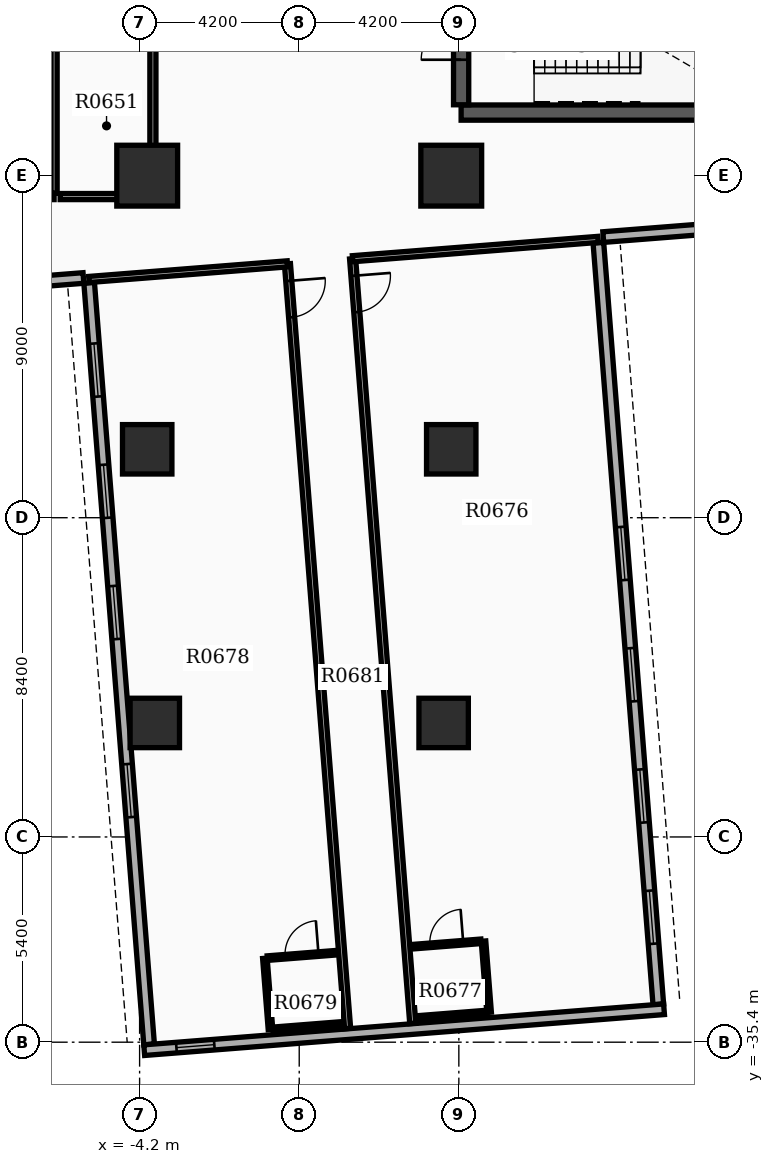
"""IFC4 building model, lengths in metres.
Left out: names, types, materials, properties, quantities, classifications, styles, units other than length and angle.
Written with IfcOpenShell. Run it as: python <this file> out.ifc"""

import sys

from ifc_helpers import new_model, si_unit, direction, frame, frame_2d, origin, origin_2d, place, context, subcontext, project, spatial, rectangle, extrude, element, fill, save


model = new_model("IFC4")
c1 = context("Model", 3, precision=1e-05, world=origin(), true_north=direction((0.0, 1.0)))
c2 = subcontext(c1, "Body", "Model", "MODEL_VIEW")
j1 = project(units=[si_unit("LENGTHUNIT", "METRE"), si_unit("PLANEANGLEUNIT", "RADIAN")], contexts=[c1])
p1 = place(None, origin())
s1 = spatial("IfcSite", under=j1, at=p1, CompositionType="ELEMENT")
p2 = place(p1, origin())
s2 = spatial("IfcBuilding", under=s1, at=p2, CompositionType="ELEMENT")
p3 = place(p2, frame((0.0, 0.0, 43.2)))
s3 = spatial("IfcBuildingStorey", under=s2, at=p3, CompositionType="ELEMENT", Elevation=43.2)
p4 = place(p3, frame((4.26, -10.94, 0.0), z_axis=(0.0, 0.0, 1.0), x_axis=(1.0, 0.0, 0.0)))
e1 = element("IfcWall", 1, at=p4, inside=s3, PredefinedType="SHEAR", context=c2, shape_type="SweptSolid", body=[
    extrude(rectangle(XDim=7.96, YDim=0.4, at=frame_2d((3.98, 0.0))), origin(), (0.0, 0.0, 1.0), 3.65),
])
p5 = place(p3, frame((4.26, -10.735, 0.0), z_axis=(0.0, 0.0, 1.0), x_axis=(0.0, 1.0, 0.0)))
e2 = element("IfcWall", 2, at=p5, inside=s3, PredefinedType="SHEAR", context=c2, shape_type="SweptSolid", body=[
    extrude(rectangle(XDim=3.43, YDim=0.4, at=frame_2d((1.715, 0.0))), origin(), (0.0, 0.0, 1.0), 3.65),
])
p6 = place(p5, frame((1.185, 0.0, 0.0)))
e3 = element("IfcOpeningElement", 3, at=p6, cuts=e2, PredefinedType="OPENING", context=c2, shape_type="SweptSolid", body=[
    extrude(rectangle(XDim=1.05, YDim=2.15, at=frame_2d((0.525, 1.075))), frame((0.0, 0.21, 0.0), z_axis=(0.0, -1.0, 0.0), x_axis=(1.0, 0.0, 0.0)), (0.0, 0.0, 1.0), 0.42),
])
for number, where, z_axis, x_axis in (
    (4, (-4.0, -12.6, 0.0), (0.0, 0.0, 1.0), (1.0, 0.0, 0.0)),
    (5, (4.0, -12.6, 0.0), (0.0, 0.0, 1.0), (1.0, 0.0, 0.0)),
):
    element("IfcColumn", number, at=place(p3, frame(where, z_axis=z_axis, x_axis=x_axis)), inside=s3, PredefinedType="COLUMN", context=c2, shape_type="SweptSolid", body=[
        extrude(rectangle(XDim=1.6, YDim=1.6, at=origin_2d()), origin(), (0.0, 0.0, 1.0), 3.9),
    ])
for number, where, z_axis, x_axis in (
    (6, (-4.0, -19.8, 0.0), (0.0, 0.0, 1.0), (1.0, 0.0, 0.0)),
    (7, (4.0, -19.8, 0.0), (0.0, 0.0, 1.0), (1.0, 0.0, 0.0)),
    (8, (-3.8, -27.0, 0.0), (0.0, 0.0, 1.0), (1.0, 0.0, 0.0)),
    (9, (3.8, -27.0, 0.0), (0.0, 0.0, 1.0), (1.0, 0.0, 0.0)),
):
    element("IfcColumn", number, at=place(p3, frame(where, z_axis=z_axis, x_axis=x_axis)), inside=s3, PredefinedType="COLUMN", context=c2, shape_type="SweptSolid", body=[
        extrude(rectangle(XDim=1.3, YDim=1.3, at=origin_2d()), origin(), (0.0, 0.0, 1.0), 3.9),
    ])
p7 = place(p3, frame((-5.527, -15.421, 0.0), z_axis=(0.0, 0.0, 1.0), x_axis=(0.078452802979, -0.996917828963, 0.0)))
e10 = element("IfcWall", 10, at=p7, inside=s3, PredefinedType="STANDARD", context=c2, shape_type="SweptSolid", body=[
    extrude(rectangle(XDim=20.1, YDim=0.28, at=frame_2d((10.05, 0.0))), origin(), (0.0, 0.0, 1.0), 2.86),
])
p8 = place(p7, frame((1.6, 0.0, 0.8)))
e11 = element("IfcOpeningElement", 11, at=p8, cuts=e10, PredefinedType="OPENING", context=c2, shape_type="SweptSolid", body=[
    extrude(rectangle(XDim=1.4, YDim=1.6, at=frame_2d((0.7, 0.8))), frame((0.0, 0.15, 0.0), z_axis=(0.0, -1.0, 0.0), x_axis=(1.0, 0.0, 0.0)), (0.0, 0.0, 1.0), 0.3),
])
p9 = place(p7, frame((4.8, 0.0, 0.8)))
e12 = element("IfcOpeningElement", 12, at=p9, cuts=e10, PredefinedType="OPENING", context=c2, shape_type="SweptSolid", body=[
    extrude(rectangle(XDim=1.4, YDim=1.6, at=frame_2d((0.7, 0.8))), frame((0.0, 0.15, 0.0), z_axis=(0.0, -1.0, 0.0), x_axis=(1.0, 0.0, 0.0)), (0.0, 0.0, 1.0), 0.3),
])
p10 = place(p7, frame((8.0, 0.0, 0.8)))
e13 = element("IfcOpeningElement", 13, at=p10, cuts=e10, PredefinedType="OPENING", context=c2, shape_type="SweptSolid", body=[
    extrude(rectangle(XDim=1.4, YDim=1.6, at=frame_2d((0.7, 0.8))), frame((0.0, 0.15, 0.0), z_axis=(0.0, -1.0, 0.0), x_axis=(1.0, 0.0, 0.0)), (0.0, 0.0, 1.0), 0.3),
])
p11 = place(p7, frame((12.7, 0.0, 0.8)))
e14 = element("IfcOpeningElement", 14, at=p11, cuts=e10, PredefinedType="OPENING", context=c2, shape_type="SweptSolid", body=[
    extrude(rectangle(XDim=1.4, YDim=1.6, at=frame_2d((0.7, 0.8))), frame((0.0, 0.15, 0.0), z_axis=(0.0, -1.0, 0.0), x_axis=(1.0, 0.0, 0.0)), (0.0, 0.0, 1.0), 0.3),
])
p12 = place(p3, frame((9.448, -34.405, 0.0), z_axis=(0.0, 0.0, 1.0), x_axis=(-0.078452802979, 0.996917828963, 0.0)))
e15 = element("IfcWall", 15, at=p12, inside=s3, PredefinedType="STANDARD", context=c2, shape_type="SweptSolid", body=[
    extrude(rectangle(XDim=20.1, YDim=0.28, at=frame_2d((10.05, 0.0))), origin(), (0.0, 0.0, 1.0), 2.86),
])
p13 = place(p12, frame((1.6, 0.0, 0.8)))
e16 = element("IfcOpeningElement", 16, at=p13, cuts=e15, PredefinedType="OPENING", context=c2, shape_type="SweptSolid", body=[
    extrude(rectangle(XDim=1.4, YDim=1.6, at=frame_2d((0.7, 0.8))), frame((0.0, 0.15, 0.0), z_axis=(0.0, -1.0, 0.0), x_axis=(1.0, 0.0, 0.0)), (0.0, 0.0, 1.0), 0.3),
])
p14 = place(p12, frame((4.8, 0.0, 0.8)))
e17 = element("IfcOpeningElement", 17, at=p14, cuts=e15, PredefinedType="OPENING", context=c2, shape_type="SweptSolid", body=[
    extrude(rectangle(XDim=1.4, YDim=1.6, at=frame_2d((0.7, 0.8))), frame((0.0, 0.15, 0.0), z_axis=(0.0, -1.0, 0.0), x_axis=(1.0, 0.0, 0.0)), (0.0, 0.0, 1.0), 0.3),
])
p15 = place(p12, frame((8.0, 0.0, 0.8)))
e18 = element("IfcOpeningElement", 18, at=p15, cuts=e15, PredefinedType="OPENING", context=c2, shape_type="SweptSolid", body=[
    extrude(rectangle(XDim=1.4, YDim=1.6, at=frame_2d((0.7, 0.8))), frame((0.0, 0.15, 0.0), z_axis=(0.0, -1.0, 0.0), x_axis=(1.0, 0.0, 0.0)), (0.0, 0.0, 1.0), 0.3),
])
p16 = place(p12, frame((11.2, 0.0, 0.8)))
e19 = element("IfcOpeningElement", 19, at=p16, cuts=e15, PredefinedType="OPENING", context=c2, shape_type="SweptSolid", body=[
    extrude(rectangle(XDim=1.4, YDim=1.6, at=frame_2d((0.7, 0.8))), frame((0.0, 0.15, 0.0), z_axis=(0.0, -1.0, 0.0), x_axis=(1.0, 0.0, 0.0)), (0.0, 0.0, 1.0), 0.3),
])
p17 = place(p3, frame((-4.079, -35.61, 0.0), z_axis=(0.0, 0.0, 1.0), x_axis=(0.996916198482, 0.078473519122, 0.0)))
e20 = element("IfcWall", 20, at=p17, inside=s3, PredefinedType="STANDARD", context=c2, shape_type="SweptSolid", body=[
    extrude(rectangle(XDim=13.72, YDim=0.28, at=frame_2d((6.86, 0.0))), origin(), (0.0, 0.0, 1.0), 2.86),
])
p18 = place(p17, frame((0.85, 0.0, 0.85)))
e21 = element("IfcOpeningElement", 21, at=p18, cuts=e20, PredefinedType="OPENING", context=c2, shape_type="SweptSolid", body=[
    extrude(rectangle(XDim=1.0, YDim=1.5, at=frame_2d((0.5, 0.75))), frame((0.0, 0.15, 0.0), z_axis=(0.0, -1.0, 0.0), x_axis=(1.0, 0.0, 0.0)), (0.0, 0.0, 1.0), 0.3),
])
p19 = place(p3, frame((-11.958, -15.787, 0.0), z_axis=(0.0, 0.0, 1.0), x_axis=(0.996916125428, 0.078474447191, 0.0)))
e22 = element("IfcWall", 22, at=p19, inside=s3, PredefinedType="STANDARD", context=c2, shape_type="SweptSolid", body=[
    extrude(rectangle(XDim=6.3, YDim=0.28, at=frame_2d((3.15, 0.0))), origin(), (0.0, 0.0, 1.0), 2.86),
])
p20 = place(p3, frame((14.281, -13.722, 0.0), z_axis=(0.0, 0.0, 1.0), x_axis=(-0.99691915642, -0.078435932851, 0.0)))
e23 = element("IfcWall", 23, at=p20, inside=s3, PredefinedType="STANDARD", context=c2, shape_type="SweptSolid", body=[
    extrude(rectangle(XDim=6.3, YDim=0.28, at=frame_2d((3.15, 0.0))), origin(), (0.0, 0.0, 1.0), 2.86),
])
p21 = place(p3, frame((-12.4, -13.15, 0.0), z_axis=(0.0, 0.0, 1.0), x_axis=(1.0, 0.0, 0.0)))
e24 = element("IfcWall", 24, at=p21, inside=s3, PredefinedType="PARTITIONING", context=c2, shape_type="SweptSolid", body=[
    extrude(rectangle(XDim=5.95, YDim=0.16, at=frame_2d((2.975, 0.0))), origin(), (0.0, 0.0, 1.0), 2.85),
])
p22 = place(p3, frame((-6.45, -13.065, 0.0), z_axis=(0.0, 0.0, 1.0), x_axis=(0.0, 1.0, 0.0)))
e25 = element("IfcWall", 25, at=p22, inside=s3, PredefinedType="PARTITIONING", context=c2, shape_type="SweptSolid", body=[
    extrude(rectangle(XDim=4.23, YDim=0.16, at=frame_2d((2.115, 0.0))), origin(), (0.0, 0.0, 1.0), 2.85),
])
p23 = place(p3, frame((-6.29, -13.15, 0.0), z_axis=(0.0, 0.0, 1.0), x_axis=(1.0, 0.0, 0.0)))
e26 = element("IfcWall", 26, at=p23, inside=s3, PredefinedType="PARTITIONING", context=c2, shape_type="SweptSolid", body=[
    extrude(rectangle(XDim=2.44, YDim=0.16, at=frame_2d((1.22, 0.0))), origin(), (0.0, 0.0, 1.0), 2.85),
])
p24 = place(p3, frame((-3.85, -13.065, 0.0), z_axis=(0.0, 0.0, 1.0), x_axis=(0.0, 1.0, 0.0)))
e27 = element("IfcWall", 27, at=p24, inside=s3, PredefinedType="PARTITIONING", context=c2, shape_type="SweptSolid", body=[
    extrude(rectangle(XDim=4.23, YDim=0.16, at=frame_2d((2.115, 0.0))), origin(), (0.0, 0.0, 1.0), 2.85),
])
p25 = place(p3, frame((1.404, -14.785, 0.0), z_axis=(0.0, 0.0, 1.0), x_axis=(0.078460461943, -0.996917226209, 0.0)))
e28 = element("IfcWall", 28, at=p25, inside=s3, PredefinedType="PARTITIONING", context=c2, shape_type="SweptSolid", body=[
    extrude(rectangle(XDim=20.182, YDim=0.16, at=frame_2d((10.091, 0.0))), origin(), (0.0, 0.0, 1.0), 2.85),
])
p26 = place(p25, frame((0.45, 0.0, 0.0)))
e29 = element("IfcOpeningElement", 29, at=p26, cuts=e28, PredefinedType="OPENING", context=c2, shape_type="SweptSolid", body=[
    extrude(rectangle(XDim=0.96, YDim=2.15, at=frame_2d((0.48, 1.075))), frame((0.0, 0.09, 0.0), z_axis=(0.0, -1.0, 0.0), x_axis=(1.0, 0.0, 0.0)), (0.0, 0.0, 1.0), 0.18),
])
p27 = place(p3, frame((1.404, -14.785, 0.0), z_axis=(0.0, 0.0, 1.0), x_axis=(0.996918883175, 0.07843940572, 0.0)))
e30 = element("IfcWall", 30, at=p27, inside=s3, PredefinedType="PARTITIONING", context=c2, shape_type="SweptSolid", body=[
    extrude(rectangle(XDim=6.48, YDim=0.16, at=frame_2d((3.24, 0.0))), origin(), (0.0, 0.0, 1.0), 2.85),
])
p28 = place(p3, frame((2.969, -32.888, 0.0), z_axis=(0.0, 0.0, 1.0), x_axis=(0.996916400774, 0.0784709492, 0.0)))
e31 = element("IfcWall", 31, at=p28, inside=s3, PredefinedType="PARTITIONING", context=c2, shape_type="SweptSolid", body=[
    extrude(rectangle(XDim=1.82, YDim=0.12, at=frame_2d((0.91, 0.0))), origin(), (0.0, 0.0, 1.0), 2.85),
])
p29 = place(p28, frame((0.47, 0.0, 0.0)))
e32 = element("IfcOpeningElement", 32, at=p29, cuts=e31, PredefinedType="OPENING", context=c2, shape_type="SweptSolid", body=[
    extrude(rectangle(XDim=0.88, YDim=2.1, at=frame_2d((0.44, 1.05))), frame((0.0, 0.07, 0.0), z_axis=(0.0, -1.0, 0.0), x_axis=(1.0, 0.0, 0.0)), (0.0, 0.0, 1.0), 0.14),
])
p30 = place(p3, frame((3.117, -34.763, 0.0), z_axis=(0.0, 0.0, 1.0), x_axis=(0.996915574626, 0.078481444107, 0.0)))
e33 = element("IfcWall", 33, at=p30, inside=s3, PredefinedType="PARTITIONING", context=c2, shape_type="SweptSolid", body=[
    extrude(rectangle(XDim=1.82, YDim=0.12, at=frame_2d((0.91, 0.0))), origin(), (0.0, 0.0, 1.0), 2.85),
])
p31 = place(p3, frame((4.849, -32.74, 0.0), z_axis=(0.0, 0.0, 1.0), x_axis=(0.07843418698, -0.996919293781, 0.0)))
e34 = element("IfcWall", 34, at=p31, inside=s3, PredefinedType="PARTITIONING", context=c2, shape_type="SweptSolid", body=[
    extrude(rectangle(XDim=1.88, YDim=0.12, at=frame_2d((0.94, 0.0))), origin(), (0.0, 0.0, 1.0), 2.85),
])
p32 = place(p3, frame((-0.31, -14.92, 0.0), z_axis=(0.0, 0.0, 1.0), x_axis=(0.078461408156, -0.996917151738, 0.0)))
e35 = element("IfcWall", 35, at=p32, inside=s3, PredefinedType="PARTITIONING", context=c2, shape_type="SweptSolid", body=[
    extrude(rectangle(XDim=20.182, YDim=0.16, at=frame_2d((10.091, 0.0))), origin(), (0.0, 0.0, 1.0), 2.85),
])
p33 = place(p32, frame((0.45, 0.0, 0.0)))
e36 = element("IfcOpeningElement", 36, at=p33, cuts=e35, PredefinedType="OPENING", context=c2, shape_type="SweptSolid", body=[
    extrude(rectangle(XDim=0.96, YDim=2.15, at=frame_2d((0.48, 1.075))), frame((0.0, 0.09, 0.0), z_axis=(0.0, -1.0, 0.0), x_axis=(1.0, 0.0, 0.0)), (0.0, 0.0, 1.0), 0.18),
])
p34 = place(p3, frame((-0.31, -14.92, 0.0), z_axis=(0.0, 0.0, 1.0), x_axis=(-0.996917262382, -0.07846000233, 0.0)))
e37 = element("IfcWall", 37, at=p34, inside=s3, PredefinedType="PARTITIONING", context=c2, shape_type="SweptSolid", body=[
    extrude(rectangle(XDim=5.24, YDim=0.16, at=frame_2d((2.62, 0.0))), origin(), (0.0, 0.0, 1.0), 2.85),
])
p35 = place(p3, frame((-0.839, -33.188, 0.0), z_axis=(0.0, 0.0, 1.0), x_axis=(0.996926062126, 0.078348112001, 0.0)))
e38 = element("IfcWall", 38, at=p35, inside=s3, PredefinedType="PARTITIONING", context=c2, shape_type="SweptSolid", body=[
    extrude(rectangle(XDim=1.82, YDim=0.12, at=frame_2d((0.91, 0.0))), origin(), (0.0, 0.0, 1.0), 2.85),
])
p36 = place(p35, frame((0.47, 0.0, 0.0)))
e39 = element("IfcOpeningElement", 39, at=p36, cuts=e38, PredefinedType="OPENING", context=c2, shape_type="SweptSolid", body=[
    extrude(rectangle(XDim=0.88, YDim=2.1, at=frame_2d((0.44, 1.05))), frame((0.0, 0.07, 0.0), z_axis=(0.0, -1.0, 0.0), x_axis=(1.0, 0.0, 0.0)), (0.0, 0.0, 1.0), 0.14),
])
p37 = place(p3, frame((-0.691, -35.062, 0.0), z_axis=(0.0, 0.0, 1.0), x_axis=(0.996916400774, 0.0784709492, 0.0)))
e40 = element("IfcWall", 40, at=p37, inside=s3, PredefinedType="PARTITIONING", context=c2, shape_type="SweptSolid", body=[
    extrude(rectangle(XDim=1.82, YDim=0.12, at=frame_2d((0.91, 0.0))), origin(), (0.0, 0.0, 1.0), 2.85),
])
p38 = place(p3, frame((-0.904, -33.193, 0.0), z_axis=(0.0, 0.0, 1.0), x_axis=(0.07843418698, -0.996919293781, 0.0)))
e41 = element("IfcWall", 41, at=p38, inside=s3, PredefinedType="PARTITIONING", context=c2, shape_type="SweptSolid", body=[
    extrude(rectangle(XDim=1.88, YDim=0.12, at=frame_2d((0.94, 0.0))), origin(), (0.0, 0.0, 1.0), 2.85),
])
p39 = place(p8, origin())
e42 = element("IfcWindow", 42, at=p39, inside=s3, PartitioningType="SINGLE_PANEL", PredefinedType="WINDOW", context=c2, shape_type="SweptSolid", body=[
    extrude(rectangle(XDim=1.4, YDim=1.6, at=frame_2d((0.7, 0.8))), frame((0.0, 0.03, 0.0), z_axis=(0.0, -1.0, 0.0), x_axis=(1.0, 0.0, 0.0)), (0.0, 0.0, 1.0), 0.06),
])
fill(e11, e42)
p40 = place(p9, origin())
e43 = element("IfcWindow", 43, at=p40, inside=s3, PartitioningType="SINGLE_PANEL", PredefinedType="WINDOW", context=c2, shape_type="SweptSolid", body=[
    extrude(rectangle(XDim=1.4, YDim=1.6, at=frame_2d((0.7, 0.8))), frame((0.0, 0.03, 0.0), z_axis=(0.0, -1.0, 0.0), x_axis=(1.0, 0.0, 0.0)), (0.0, 0.0, 1.0), 0.06),
])
fill(e12, e43)
p41 = place(p10, origin())
e44 = element("IfcWindow", 44, at=p41, inside=s3, PartitioningType="SINGLE_PANEL", PredefinedType="WINDOW", context=c2, shape_type="SweptSolid", body=[
    extrude(rectangle(XDim=1.4, YDim=1.6, at=frame_2d((0.7, 0.8))), frame((0.0, 0.03, 0.0), z_axis=(0.0, -1.0, 0.0), x_axis=(1.0, 0.0, 0.0)), (0.0, 0.0, 1.0), 0.06),
])
fill(e13, e44)
p42 = place(p11, origin())
e45 = element("IfcWindow", 45, at=p42, inside=s3, PartitioningType="SINGLE_PANEL", PredefinedType="WINDOW", context=c2, shape_type="SweptSolid", body=[
    extrude(rectangle(XDim=1.4, YDim=1.6, at=frame_2d((0.7, 0.8))), frame((0.0, 0.03, 0.0), z_axis=(0.0, -1.0, 0.0), x_axis=(1.0, 0.0, 0.0)), (0.0, 0.0, 1.0), 0.06),
])
fill(e14, e45)
p43 = place(p13, origin())
e46 = element("IfcWindow", 46, at=p43, inside=s3, PartitioningType="SINGLE_PANEL", PredefinedType="WINDOW", context=c2, shape_type="SweptSolid", body=[
    extrude(rectangle(XDim=1.4, YDim=1.6, at=frame_2d((0.7, 0.8))), frame((0.0, 0.03, 0.0), z_axis=(0.0, -1.0, 0.0), x_axis=(1.0, 0.0, 0.0)), (0.0, 0.0, 1.0), 0.06),
])
fill(e16, e46)
p44 = place(p14, origin())
e47 = element("IfcWindow", 47, at=p44, inside=s3, PartitioningType="SINGLE_PANEL", PredefinedType="WINDOW", context=c2, shape_type="SweptSolid", body=[
    extrude(rectangle(XDim=1.4, YDim=1.6, at=frame_2d((0.7, 0.8))), frame((0.0, 0.03, 0.0), z_axis=(0.0, -1.0, 0.0), x_axis=(1.0, 0.0, 0.0)), (0.0, 0.0, 1.0), 0.06),
])
fill(e17, e47)
p45 = place(p15, origin())
e48 = element("IfcWindow", 48, at=p45, inside=s3, PartitioningType="SINGLE_PANEL", PredefinedType="WINDOW", context=c2, shape_type="SweptSolid", body=[
    extrude(rectangle(XDim=1.4, YDim=1.6, at=frame_2d((0.7, 0.8))), frame((0.0, 0.03, 0.0), z_axis=(0.0, -1.0, 0.0), x_axis=(1.0, 0.0, 0.0)), (0.0, 0.0, 1.0), 0.06),
])
fill(e18, e48)
p46 = place(p16, origin())
e49 = element("IfcWindow", 49, at=p46, inside=s3, PartitioningType="SINGLE_PANEL", PredefinedType="WINDOW", context=c2, shape_type="SweptSolid", body=[
    extrude(rectangle(XDim=1.4, YDim=1.6, at=frame_2d((0.7, 0.8))), frame((0.0, 0.03, 0.0), z_axis=(0.0, -1.0, 0.0), x_axis=(1.0, 0.0, 0.0)), (0.0, 0.0, 1.0), 0.06),
])
fill(e19, e49)
p47 = place(p18, origin())
e50 = element("IfcWindow", 50, at=p47, inside=s3, PartitioningType="SINGLE_PANEL", PredefinedType="WINDOW", context=c2, shape_type="SweptSolid", body=[
    extrude(rectangle(XDim=1.0, YDim=1.5, at=frame_2d((0.5, 0.75))), frame((0.0, 0.03, 0.0), z_axis=(0.0, -1.0, 0.0), x_axis=(1.0, 0.0, 0.0)), (0.0, 0.0, 1.0), 0.06),
])
fill(e21, e50)
p48 = place(p6, origin())
e51 = element("IfcDoor", 51, at=p48, inside=s3, OperationType="SINGLE_SWING_LEFT", PredefinedType="DOOR", context=c2, shape_type="SweptSolid", body=[
    extrude(rectangle(XDim=1.05, YDim=2.15, at=frame_2d((0.525, 1.075))), frame((0.0, 0.025, 0.0), z_axis=(0.0, -1.0, 0.0), x_axis=(1.0, 0.0, 0.0)), (0.0, 0.0, 1.0), 0.05),
])
fill(e3, e51)
p49 = place(p26, origin())
e52 = element("IfcDoor", 52, at=p49, inside=s3, OperationType="SINGLE_SWING_LEFT", PredefinedType="DOOR", context=c2, shape_type="SweptSolid", body=[
    extrude(rectangle(XDim=0.96, YDim=2.15, at=frame_2d((0.48, 1.075))), frame((0.0, 0.025, 0.0), z_axis=(0.0, -1.0, 0.0), x_axis=(1.0, 0.0, 0.0)), (0.0, 0.0, 1.0), 0.05),
])
fill(e29, e52)
p50 = place(p29, origin())
e53 = element("IfcDoor", 53, at=p50, inside=s3, OperationType="SINGLE_SWING_RIGHT", PredefinedType="DOOR", context=c2, shape_type="SweptSolid", body=[
    extrude(rectangle(XDim=0.88, YDim=2.1, at=frame_2d((0.44, 1.05))), frame((0.0, 0.025, 0.0), z_axis=(0.0, -1.0, 0.0), x_axis=(1.0, 0.0, 0.0)), (0.0, 0.0, 1.0), 0.05),
])
fill(e32, e53)
p51 = place(p33, origin())
e54 = element("IfcDoor", 54, at=p51, inside=s3, OperationType="SINGLE_SWING_LEFT", PredefinedType="DOOR", context=c2, shape_type="SweptSolid", body=[
    extrude(rectangle(XDim=0.96, YDim=2.15, at=frame_2d((0.48, 1.075))), frame((0.0, 0.025, 0.0), z_axis=(0.0, -1.0, 0.0), x_axis=(1.0, 0.0, 0.0)), (0.0, 0.0, 1.0), 0.05),
])
fill(e36, e54)
p52 = place(p36, origin())
e55 = element("IfcDoor", 55, at=p52, inside=s3, OperationType="SINGLE_SWING_RIGHT", PredefinedType="DOOR", context=c2, shape_type="SweptSolid", body=[
    extrude(rectangle(XDim=0.88, YDim=2.1, at=frame_2d((0.44, 1.05))), frame((0.0, 0.025, 0.0), z_axis=(0.0, -1.0, 0.0), x_axis=(1.0, 0.0, 0.0)), (0.0, 0.0, 1.0), 0.05),
])
fill(e39, e55)
save(model, sys.argv[1])
